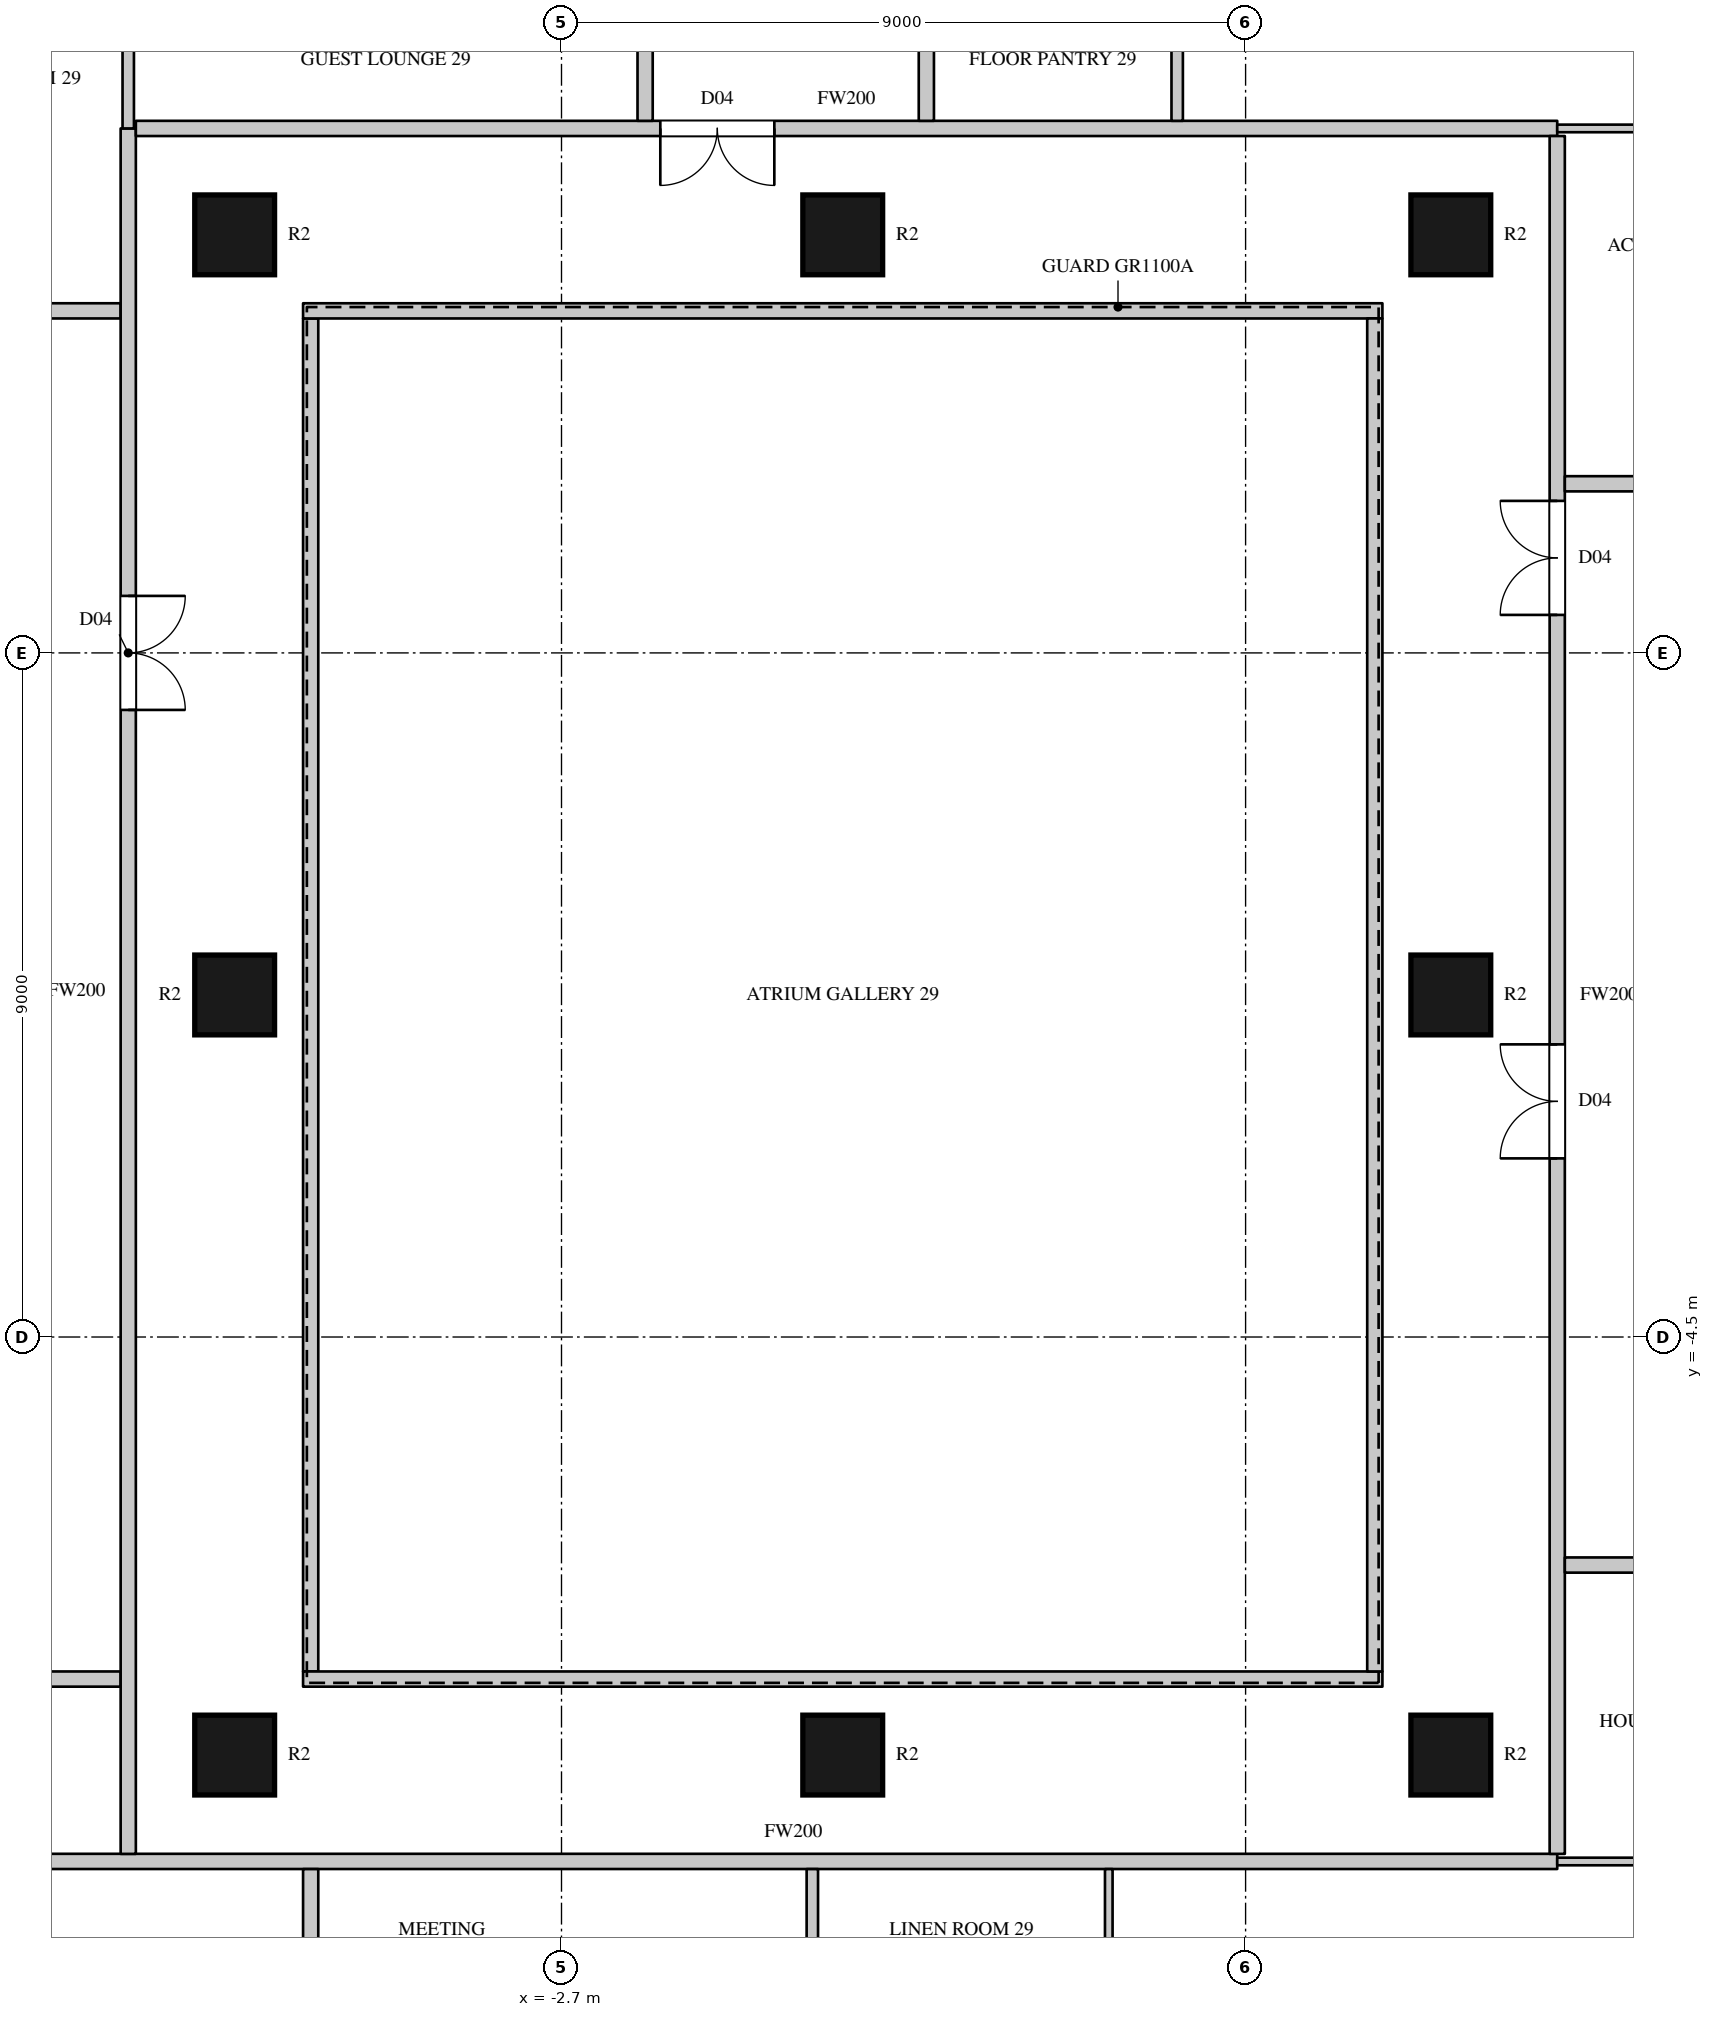
"""IFC4 building model, lengths in metres.
Left out: names, types, materials, properties, quantities, classifications, styles, units other than length and angle.
Written with IfcOpenShell. Run it as: python <this file> out.ifc"""

import sys

from ifc_helpers import new_model, si_unit, direction, frame, frame_2d, origin, origin_2d, place, context, subcontext, project, spatial, rectangle, circle, extrude, element, fill, save


model = new_model("IFC4")
c1 = context("Model", 3, precision=1e-05, world=origin(), true_north=direction((0.0, 1.0)))
c2 = subcontext(c1, "Body", "Model", "MODEL_VIEW")
j1 = project(units=[si_unit("LENGTHUNIT", "METRE"), si_unit("PLANEANGLEUNIT", "RADIAN")], contexts=[c1])
p1 = place(None, origin())
s1 = spatial("IfcSite", under=j1, at=p1, CompositionType="ELEMENT")
p2 = place(p1, origin())
s2 = spatial("IfcBuilding", under=s1, at=p2, CompositionType="ELEMENT")
p3 = place(p2, frame((0.0, 0.0, 134.7)))
s3 = spatial("IfcBuildingStorey", under=s2, at=p3, CompositionType="ELEMENT", Elevation=134.7)
for number, where, z_axis, x_axis in (
    (1, (-7.0, -10.0, 0.0), (0.0, 0.0, 1.0), (1.0, 0.0, 0.0)),
    (2, (-7.0, 0.0, 0.0), (0.0, 0.0, 1.0), (1.0, 0.0, 0.0)),
    (3, (-7.0, 10.0, 0.0), (0.0, 0.0, 1.0), (1.0, 0.0, 0.0)),
    (4, (1.0, -10.0, 0.0), (0.0, 0.0, 1.0), (1.0, 0.0, 0.0)),
    (5, (1.0, 10.0, 0.0), (0.0, 0.0, 1.0), (1.0, 0.0, 0.0)),
    (6, (9.0, -10.0, 0.0), (0.0, 0.0, 1.0), (1.0, 0.0, 0.0)),
    (7, (9.0, 0.0, 0.0), (0.0, 0.0, 1.0), (1.0, 0.0, 0.0)),
    (8, (9.0, 10.0, 0.0), (0.0, 0.0, 1.0), (1.0, 0.0, 0.0)),
):
    element("IfcColumn", number, at=place(p3, frame(where, z_axis=z_axis, x_axis=x_axis)), inside=s3, PredefinedType="COLUMN", context=c2, shape_type="SweptSolid", body=[
        extrude(circle(Radius=0.525, at=origin_2d()), origin(), (0.0, 0.0, 1.0), 3.6),
    ])
p4 = place(p3, frame((-13.97, -9.0, 0.0), z_axis=(0.0, 0.0, 1.0), x_axis=(1.0, 0.0, 0.0)))
e9 = element("IfcWall", 9, at=p4, inside=s3, PredefinedType="PARTITIONING", context=c2, shape_type="SweptSolid", body=[
    extrude(rectangle(XDim=5.47, YDim=0.2, at=frame_2d((2.735, 0.0))), origin(), (0.0, 0.0, 1.0), 3.3),
])
p5 = place(p4, frame((0.4, 0.0, 0.0)))
e10 = element("IfcOpeningElement", 10, at=p5, cuts=e9, PredefinedType="OPENING", context=c2, shape_type="SweptSolid", body=[
    extrude(rectangle(XDim=1.5, YDim=2.2, at=frame_2d((0.75, 1.1))), frame((0.0, 0.11, 0.0), z_axis=(0.0, -1.0, 0.0), x_axis=(1.0, 0.0, 0.0)), (0.0, 0.0, 1.0), 0.22),
])
p6 = place(p3, frame((-13.97, 9.0, 0.0), z_axis=(0.0, 0.0, 1.0), x_axis=(1.0, 0.0, 0.0)))
e11 = element("IfcWall", 11, at=p6, inside=s3, PredefinedType="PARTITIONING", context=c2, shape_type="SweptSolid", body=[
    extrude(rectangle(XDim=5.47, YDim=0.2, at=frame_2d((2.735, 0.0))), origin(), (0.0, 0.0, 1.0), 3.3),
])
p7 = place(p6, frame((0.4, 0.0, 0.0)))
e12 = element("IfcOpeningElement", 12, at=p7, cuts=e11, PredefinedType="OPENING", context=c2, shape_type="SweptSolid", body=[
    extrude(rectangle(XDim=1.5, YDim=2.2, at=frame_2d((0.75, 1.1))), frame((0.0, 0.11, 0.0), z_axis=(0.0, -1.0, 0.0), x_axis=(1.0, 0.0, 0.0)), (0.0, 0.0, 1.0), 0.22),
])
p8 = place(p3, frame((-9.7, -11.399, 0.0), z_axis=(0.0, 0.0, 1.0), x_axis=(1.0, 0.0, 0.0)))
e13 = element("IfcWall", 13, at=p8, inside=s3, PredefinedType="PARTITIONING", context=c2, shape_type="SweptSolid", body=[
    extrude(rectangle(XDim=20.1, YDim=0.2, at=frame_2d((10.05, 0.0))), origin(), (0.0, 0.0, 1.0), 3.3),
])
p9 = place(p3, frame((-8.4, -11.3, 0.0), z_axis=(0.0, 0.0, 1.0), x_axis=(0.0, 1.0, 0.0)))
e14 = element("IfcWall", 14, at=p9, inside=s3, PredefinedType="PARTITIONING", context=c2, shape_type="SweptSolid", body=[
    extrude(rectangle(XDim=22.7, YDim=0.2, at=frame_2d((11.35, 0.0))), origin(), (0.0, 0.0, 1.0), 3.3),
])
p10 = place(p9, frame((15.05, 0.0, 0.0)))
e15 = element("IfcOpeningElement", 15, at=p10, cuts=e14, PredefinedType="OPENING", context=c2, shape_type="SweptSolid", body=[
    extrude(rectangle(XDim=1.5, YDim=2.2, at=frame_2d((0.75, 1.1))), frame((0.0, 0.11, 0.0), z_axis=(0.0, -1.0, 0.0), x_axis=(1.0, 0.0, 0.0)), (0.0, 0.0, 1.0), 0.22),
])
p11 = place(p3, frame((-8.3, 11.4, 0.0), z_axis=(0.0, 0.0, 1.0), x_axis=(1.0, 0.0, 0.0)))
e16 = element("IfcWall", 16, at=p11, inside=s3, PredefinedType="PARTITIONING", context=c2, shape_type="SweptSolid", body=[
    extrude(rectangle(XDim=18.7, YDim=0.2, at=frame_2d((9.35, 0.0))), origin(), (0.0, 0.0, 1.0), 3.3),
])
p12 = place(p11, frame((6.9, 0.0, 0.0)))
e17 = element("IfcOpeningElement", 17, at=p12, cuts=e16, PredefinedType="OPENING", context=c2, shape_type="SweptSolid", body=[
    extrude(rectangle(XDim=1.5, YDim=2.2, at=frame_2d((0.75, 1.1))), frame((0.0, 0.11, 0.0), z_axis=(0.0, -1.0, 0.0), x_axis=(1.0, 0.0, 0.0)), (0.0, 0.0, 1.0), 0.22),
])
p13 = place(p3, frame((-6.0, -15.0, 0.0), z_axis=(0.0, 0.0, 1.0), x_axis=(0.0, 1.0, 0.0)))
e18 = element("IfcWall", 18, at=p13, inside=s3, PredefinedType="PARTITIONING", context=c2, shape_type="SweptSolid", body=[
    extrude(rectangle(XDim=3.5, YDim=0.2, at=frame_2d((1.75, 0.0))), origin(), (0.0, 0.0, 1.0), 3.3),
])
p14 = place(p13, frame((0.15, 0.0, 0.0)))
e19 = element("IfcOpeningElement", 19, at=p14, cuts=e18, PredefinedType="OPENING", context=c2, shape_type="SweptSolid", body=[
    extrude(rectangle(XDim=0.95, YDim=2.2, at=frame_2d((0.475, 1.1))), frame((0.0, 0.11, 0.0), z_axis=(0.0, -1.0, 0.0), x_axis=(1.0, 0.0, 0.0)), (0.0, 0.0, 1.0), 0.22),
])
p15 = place(p3, frame((-6.0, -8.9, 0.0), z_axis=(0.0, 0.0, 1.0), x_axis=(0.0, 1.0, 0.0)))
e20 = element("IfcWall", 20, at=p15, inside=s3, PredefinedType="PARTITIONING", context=c2, shape_type="SweptSolid", body=[
    extrude(rectangle(XDim=17.8, YDim=0.2, at=frame_2d((8.9, 0.0))), origin(), (0.0, 0.0, 1.0), 3.3),
])
for number, where, z_axis, x_axis in (
    (21, (-6.1, -9.0, 0.0), (0.0, 0.0, 1.0), (1.0, 0.0, 0.0)),
    (22, (-6.1, 9.0, 0.0), (0.0, 0.0, 1.0), (1.0, 0.0, 0.0)),
):
    element("IfcWall", number, at=place(p3, frame(where, z_axis=z_axis, x_axis=x_axis)), inside=s3, PredefinedType="PARTITIONING", context=c2, shape_type="SweptSolid", body=[
        extrude(rectangle(XDim=14.2, YDim=0.2, at=frame_2d((7.1, 0.0))), origin(), (0.0, 0.0, 1.0), 3.3),
    ])
p16 = place(p3, frame((-1.6, 11.5, 0.0), z_axis=(0.0, 0.0, 1.0), x_axis=(0.0, 1.0, 0.0)))
e23 = element("IfcWall", 23, at=p16, inside=s3, PredefinedType="PARTITIONING", context=c2, shape_type="SweptSolid", body=[
    extrude(rectangle(XDim=3.5, YDim=0.2, at=frame_2d((1.75, 0.0))), origin(), (0.0, 0.0, 1.0), 3.3),
])
p17 = place(p3, frame((2.1, 11.5, 0.0), z_axis=(0.0, 0.0, 1.0), x_axis=(0.0, 1.0, 0.0)))
e24 = element("IfcWall", 24, at=p17, inside=s3, PredefinedType="PARTITIONING", context=c2, shape_type="SweptSolid", body=[
    extrude(rectangle(XDim=3.5, YDim=0.2, at=frame_2d((1.75, 0.0))), origin(), (0.0, 0.0, 1.0), 3.3),
])
p18 = place(p17, frame((2.4, 0.0, 0.0)))
e25 = element("IfcOpeningElement", 25, at=p18, cuts=e24, PredefinedType="OPENING", context=c2, shape_type="SweptSolid", body=[
    extrude(rectangle(XDim=0.95, YDim=2.2, at=frame_2d((0.475, 1.1))), frame((0.0, 0.11, 0.0), z_axis=(0.0, -1.0, 0.0), x_axis=(1.0, 0.0, 0.0)), (0.0, 0.0, 1.0), 0.22),
])
p19 = place(p3, frame((8.0, -8.9, 0.0), z_axis=(0.0, 0.0, 1.0), x_axis=(0.0, 1.0, 0.0)))
e26 = element("IfcWall", 26, at=p19, inside=s3, PredefinedType="PARTITIONING", context=c2, shape_type="SweptSolid", body=[
    extrude(rectangle(XDim=17.8, YDim=0.2, at=frame_2d((8.9, 0.0))), origin(), (0.0, 0.0, 1.0), 3.3),
])
p20 = place(p3, frame((10.4, -11.3, 0.0), z_axis=(0.0, 0.0, 1.0), x_axis=(0.0, 1.0, 0.0)))
e27 = element("IfcWall", 27, at=p20, inside=s3, PredefinedType="PARTITIONING", context=c2, shape_type="SweptSolid", body=[
    extrude(rectangle(XDim=22.6, YDim=0.2, at=frame_2d((11.3, 0.0))), origin(), (0.0, 0.0, 1.0), 3.3),
])
p21 = place(p20, frame((16.3, 0.0, 0.0)))
e28 = element("IfcOpeningElement", 28, at=p21, cuts=e27, PredefinedType="OPENING", context=c2, shape_type="SweptSolid", body=[
    extrude(rectangle(XDim=1.5, YDim=2.2, at=frame_2d((0.75, 1.1))), frame((0.0, 0.11, 0.0), z_axis=(0.0, -1.0, 0.0), x_axis=(1.0, 0.0, 0.0)), (0.0, 0.0, 1.0), 0.22),
])
p22 = place(p20, frame((9.15, 0.0, 0.0)))
e29 = element("IfcOpeningElement", 29, at=p22, cuts=e27, PredefinedType="OPENING", context=c2, shape_type="SweptSolid", body=[
    extrude(rectangle(XDim=1.5, YDim=2.2, at=frame_2d((0.75, 1.1))), frame((0.0, 0.11, 0.0), z_axis=(0.0, -1.0, 0.0), x_axis=(1.0, 0.0, 0.0)), (0.0, 0.0, 1.0), 0.22),
])
p23 = place(p3, frame((10.5, -7.5, 0.0), z_axis=(0.0, 0.0, 1.0), x_axis=(1.0, 0.0, 0.0)))
e30 = element("IfcWall", 30, at=p23, inside=s3, PredefinedType="PARTITIONING", context=c2, shape_type="SweptSolid", body=[
    extrude(rectangle(XDim=3.3, YDim=0.2, at=frame_2d((1.65, 0.0))), origin(), (0.0, 0.0, 1.0), 3.3),
])
p24 = place(p23, frame((2.05, 0.0, 0.0)))
e31 = element("IfcOpeningElement", 31, at=p24, cuts=e30, PredefinedType="OPENING", context=c2, shape_type="SweptSolid", body=[
    extrude(rectangle(XDim=0.9, YDim=2.2, at=frame_2d((0.45, 1.1))), frame((0.0, 0.11, 0.0), z_axis=(0.0, -1.0, 0.0), x_axis=(1.0, 0.0, 0.0)), (0.0, 0.0, 1.0), 0.22),
])
p25 = place(p3, frame((10.5, 6.725, 0.0), z_axis=(0.0, 0.0, 1.0), x_axis=(1.0, 0.0, 0.0)))
e32 = element("IfcWall", 32, at=p25, inside=s3, PredefinedType="PARTITIONING", context=c2, shape_type="SweptSolid", body=[
    extrude(rectangle(XDim=3.3, YDim=0.2, at=frame_2d((1.65, 0.0))), origin(), (0.0, 0.0, 1.0), 3.3),
])
p26 = place(p25, frame((2.05, 0.0, 0.0)))
e33 = element("IfcOpeningElement", 33, at=p26, cuts=e32, PredefinedType="OPENING", context=c2, shape_type="SweptSolid", body=[
    extrude(rectangle(XDim=0.9, YDim=2.2, at=frame_2d((0.45, 1.1))), frame((0.0, 0.11, 0.0), z_axis=(0.0, -1.0, 0.0), x_axis=(1.0, 0.0, 0.0)), (0.0, 0.0, 1.0), 0.22),
])
p27 = place(p3, frame((-8.4, 11.4, 0.0), z_axis=(0.0, 0.0, 1.0), x_axis=(0.0, 1.0, 0.0)))
e34 = element("IfcWall", 34, at=p27, inside=s3, PredefinedType="PARTITIONING", context=c2, shape_type="SweptSolid", body=[
    extrude(rectangle(XDim=3.6, YDim=0.15, at=frame_2d((1.8, 0.0))), origin(), (0.0, 0.0, 1.0), 3.3),
])
for number, where, z_axis, x_axis in (
    (35, (0.6, -15.0, 0.0), (0.0, 0.0, 1.0), (0.0, 1.0, 0.0)),
    (36, (5.4, 11.5, 0.0), (0.0, 0.0, 1.0), (0.0, 1.0, 0.0)),
):
    element("IfcWall", number, at=place(p3, frame(where, z_axis=z_axis, x_axis=x_axis)), inside=s3, PredefinedType="PARTITIONING", context=c2, shape_type="SweptSolid", body=[
        extrude(rectangle(XDim=3.5, YDim=0.15, at=frame_2d((1.75, 0.0))), origin(), (0.0, 0.0, 1.0), 3.3),
    ])
p28 = place(p3, frame((4.5, -15.0, 0.0), z_axis=(0.0, 0.0, 1.0), x_axis=(0.0, 1.0, 0.0)))
e37 = element("IfcWall", 37, at=p28, inside=s3, PredefinedType="PARTITIONING", context=c2, shape_type="SweptSolid", body=[
    extrude(rectangle(XDim=3.5, YDim=0.1, at=frame_2d((1.75, 0.0))), origin(), (0.0, 0.0, 1.0), 3.3),
])
for number, where, z_axis, x_axis in (
    (38, (10.4, -11.4, 0.0), (0.0, 0.0, 1.0), (1.0, 0.0, 0.0)),
    (39, (10.4, 11.4, 0.0), (0.0, 0.0, 1.0), (1.0, 0.0, 0.0)),
):
    element("IfcWall", number, at=place(p3, frame(where, z_axis=z_axis, x_axis=x_axis)), inside=s3, PredefinedType="PARTITIONING", context=c2, shape_type="SweptSolid", body=[
        extrude(rectangle(XDim=3.2, YDim=0.1, at=frame_2d((1.6, 0.0))), origin(), (0.0, 0.0, 1.0), 3.3),
    ])
p29 = place(p10, origin())
e40 = element("IfcDoor", 40, at=p29, inside=s3, OperationType="DOUBLE_DOOR_SINGLE_SWING", PredefinedType="DOOR", context=c2, shape_type="SweptSolid", body=[
    extrude(rectangle(XDim=1.5, YDim=2.2, at=frame_2d((0.75, 1.1))), frame((0.0, 0.025, 0.0), z_axis=(0.0, -1.0, 0.0), x_axis=(1.0, 0.0, 0.0)), (0.0, 0.0, 1.0), 0.05),
])
fill(e15, e40)
p30 = place(p12, origin())
e41 = element("IfcDoor", 41, at=p30, inside=s3, OperationType="DOUBLE_DOOR_SINGLE_SWING", PredefinedType="DOOR", context=c2, shape_type="SweptSolid", body=[
    extrude(rectangle(XDim=1.5, YDim=2.2, at=frame_2d((0.75, 1.1))), frame((0.0, 0.025, 0.0), z_axis=(0.0, -1.0, 0.0), x_axis=(1.0, 0.0, 0.0)), (0.0, 0.0, 1.0), 0.05),
])
fill(e17, e41)
p31 = place(p21, origin())
e42 = element("IfcDoor", 42, at=p31, inside=s3, OperationType="DOUBLE_DOOR_SINGLE_SWING", PredefinedType="DOOR", context=c2, shape_type="SweptSolid", body=[
    extrude(rectangle(XDim=1.5, YDim=2.2, at=frame_2d((0.75, 1.1))), frame((0.0, 0.025, 0.0), z_axis=(0.0, -1.0, 0.0), x_axis=(1.0, 0.0, 0.0)), (0.0, 0.0, 1.0), 0.05),
])
fill(e28, e42)
p32 = place(p22, origin())
e43 = element("IfcDoor", 43, at=p32, inside=s3, OperationType="DOUBLE_DOOR_SINGLE_SWING", PredefinedType="DOOR", context=c2, shape_type="SweptSolid", body=[
    extrude(rectangle(XDim=1.5, YDim=2.2, at=frame_2d((0.75, 1.1))), frame((0.0, 0.025, 0.0), z_axis=(0.0, -1.0, 0.0), x_axis=(1.0, 0.0, 0.0)), (0.0, 0.0, 1.0), 0.05),
])
fill(e29, e43)
save(model, sys.argv[1])
